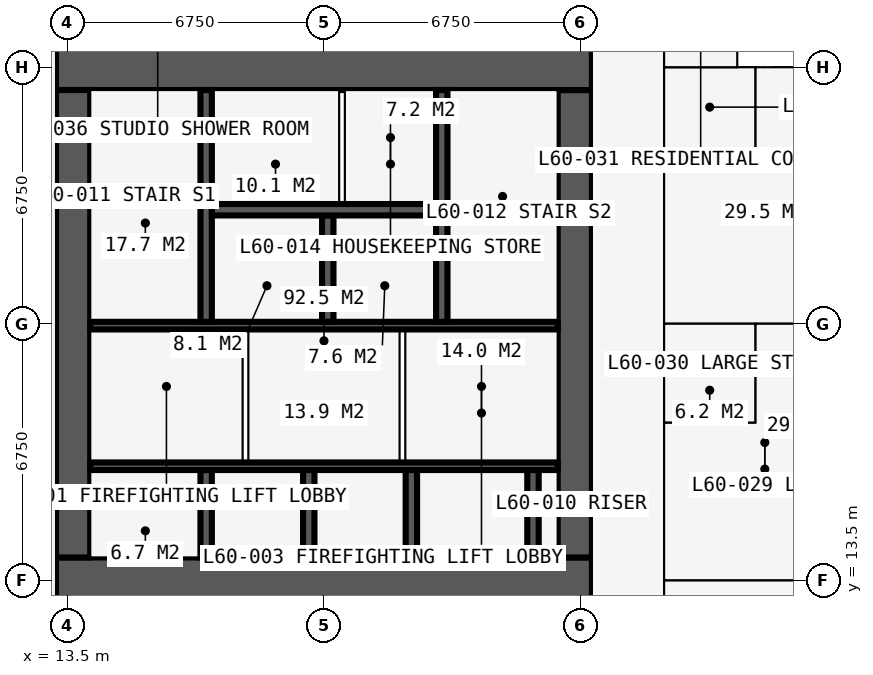
"""IFC4 building model, lengths in metres.
Left out: names, types, materials, properties, quantities, classifications, styles, units other than length and angle.
Written with IfcOpenShell. Run it as: python <this file> out.ifc"""

import sys

from ifc_helpers import new_model, si_unit, direction, frame, frame_2d, origin, place, context, subcontext, project, spatial, rectangle, extrude, element, fill, save


model = new_model("IFC4")
c1 = context("Model", 3, precision=1e-05, world=origin(), true_north=direction((0.0, 1.0)))
c2 = subcontext(c1, "Body", "Model", "MODEL_VIEW")
j1 = project(units=[si_unit("LENGTHUNIT", "METRE"), si_unit("PLANEANGLEUNIT", "RADIAN")], contexts=[c1])
p1 = place(None, origin())
s1 = spatial("IfcSite", under=j1, at=p1, CompositionType="ELEMENT")
p2 = place(p1, origin())
s2 = spatial("IfcBuilding", under=s1, at=p2, CompositionType="ELEMENT")
p3 = place(p2, frame((0.0, 0.0, 222.3)))
s3 = spatial("IfcBuildingStorey", under=s2, at=p3, CompositionType="ELEMENT", Elevation=222.3)
p4 = place(p3, frame((13.2, 13.5, 0.0), z_axis=(0.0, 0.0, 1.0), x_axis=(1.0, 0.0, 0.0)))
e1 = element("IfcWall", 1, at=p4, inside=s3, PredefinedType="SHEAR", context=c2, shape_type="SweptSolid", body=[
    extrude(rectangle(XDim=14.1, YDim=1.2, at=frame_2d((7.05, 0.0))), origin(), (0.0, 0.0, 1.0), 3.6),
])
p5 = place(p3, frame((26.85, 14.1, 0.0), z_axis=(0.0, 0.0, 1.0), x_axis=(0.0, 1.0, 0.0)))
e2 = element("IfcWall", 2, at=p5, inside=s3, PredefinedType="SHEAR", context=c2, shape_type="SweptSolid", body=[
    extrude(rectangle(XDim=12.3, YDim=0.9, at=frame_2d((6.15, 0.0))), origin(), (0.0, 0.0, 1.0), 3.6),
])
p6 = place(p5, frame((3.65, 0.0, 0.0)))
e3 = element("IfcOpeningElement", 3, at=p6, cuts=e2, PredefinedType="OPENING", context=c2, shape_type="SweptSolid", body=[
    extrude(rectangle(XDim=1.2, YDim=2.2, at=frame_2d((0.6, 1.1))), frame((0.0, 0.46, 0.0), z_axis=(0.0, -1.0, 0.0), x_axis=(1.0, 0.0, 0.0)), (0.0, 0.0, 1.0), 0.92),
])
p7 = place(p3, frame((27.3, 27.0, 0.0), z_axis=(0.0, 0.0, 1.0), x_axis=(-1.0, 0.0, 0.0)))
e4 = element("IfcWall", 4, at=p7, inside=s3, PredefinedType="SHEAR", context=c2, shape_type="SweptSolid", body=[
    extrude(rectangle(XDim=14.1, YDim=1.2, at=frame_2d((7.05, 0.0))), origin(), (0.0, 0.0, 1.0), 3.6),
])
p8 = place(p7, frame((4.55, 0.0, 0.0)))
e5 = element("IfcOpeningElement", 5, at=p8, cuts=e4, PredefinedType="OPENING", context=c2, shape_type="SweptSolid", body=[
    extrude(rectangle(XDim=0.9, YDim=2.2, at=frame_2d((0.45, 1.1))), frame((0.0, 0.61, 0.0), z_axis=(0.0, -1.0, 0.0), x_axis=(1.0, 0.0, 0.0)), (0.0, 0.0, 1.0), 1.22),
])
p9 = place(p7, frame((7.525, 0.0, 0.0)))
e6 = element("IfcOpeningElement", 6, at=p9, cuts=e4, PredefinedType="OPENING", context=c2, shape_type="SweptSolid", body=[
    extrude(rectangle(XDim=1.0, YDim=2.2, at=frame_2d((0.5, 1.1))), frame((0.0, 0.61, 0.0), z_axis=(0.0, -1.0, 0.0), x_axis=(1.0, 0.0, 0.0)), (0.0, 0.0, 1.0), 1.22),
])
p10 = place(p3, frame((13.65, 26.4, 0.0), z_axis=(0.0, 0.0, 1.0), x_axis=(0.0, -1.0, 0.0)))
e7 = element("IfcWall", 7, at=p10, inside=s3, PredefinedType="SHEAR", context=c2, shape_type="SweptSolid", body=[
    extrude(rectangle(XDim=12.3, YDim=0.9, at=frame_2d((6.15, 0.0))), origin(), (0.0, 0.0, 1.0), 3.6),
])
p11 = place(p10, frame((7.45, 0.0, 0.0)))
e8 = element("IfcOpeningElement", 8, at=p11, cuts=e7, PredefinedType="OPENING", context=c2, shape_type="SweptSolid", body=[
    extrude(rectangle(XDim=1.2, YDim=2.2, at=frame_2d((0.6, 1.1))), frame((0.0, 0.46, 0.0), z_axis=(0.0, -1.0, 0.0), x_axis=(1.0, 0.0, 0.0)), (0.0, 0.0, 1.0), 0.92),
])
p12 = place(p3, frame((14.1, 16.5, 0.0), z_axis=(0.0, 0.0, 1.0), x_axis=(1.0, 0.0, 0.0)))
e9 = element("IfcWall", 9, at=p12, inside=s3, PredefinedType="SHEAR", context=c2, shape_type="SweptSolid", body=[
    extrude(rectangle(XDim=12.3, YDim=0.2, at=frame_2d((6.15, 0.0))), origin(), (0.0, 0.0, 1.0), 3.6),
])
p13 = place(p12, frame((0.9, 0.0, 0.0)))
e10 = element("IfcOpeningElement", 10, at=p13, cuts=e9, PredefinedType="OPENING", context=c2, shape_type="SweptSolid", body=[
    extrude(rectangle(XDim=1.1, YDim=2.2, at=frame_2d((0.55, 1.1))), frame((0.0, 0.11, 0.0), z_axis=(0.0, -1.0, 0.0), x_axis=(1.0, 0.0, 0.0)), (0.0, 0.0, 1.0), 0.22),
])
p14 = place(p12, frame((4.31, 0.0, 0.0)))
e11 = element("IfcOpeningElement", 11, at=p14, cuts=e9, PredefinedType="OPENING", context=c2, shape_type="SweptSolid", body=[
    extrude(rectangle(XDim=1.1, YDim=2.2, at=frame_2d((0.55, 1.1))), frame((0.0, 0.11, 0.0), z_axis=(0.0, -1.0, 0.0), x_axis=(1.0, 0.0, 0.0)), (0.0, 0.0, 1.0), 0.22),
])
p15 = place(p12, frame((6.45, 0.0, 0.0)))
e12 = element("IfcOpeningElement", 12, at=p15, cuts=e9, PredefinedType="OPENING", context=c2, shape_type="SweptSolid", body=[
    extrude(rectangle(XDim=1.1, YDim=2.2, at=frame_2d((0.55, 1.1))), frame((0.0, 0.11, 0.0), z_axis=(0.0, -1.0, 0.0), x_axis=(1.0, 0.0, 0.0)), (0.0, 0.0, 1.0), 0.22),
])
p16 = place(p12, frame((9.5, 0.0, 0.0)))
e13 = element("IfcOpeningElement", 13, at=p16, cuts=e9, PredefinedType="OPENING", context=c2, shape_type="SweptSolid", body=[
    extrude(rectangle(XDim=1.1, YDim=2.2, at=frame_2d((0.55, 1.1))), frame((0.0, 0.11, 0.0), z_axis=(0.0, -1.0, 0.0), x_axis=(1.0, 0.0, 0.0)), (0.0, 0.0, 1.0), 0.22),
])
p17 = place(p3, frame((14.1, 20.2, 0.0), z_axis=(0.0, 0.0, 1.0), x_axis=(1.0, 0.0, 0.0)))
e14 = element("IfcWall", 14, at=p17, inside=s3, PredefinedType="SHEAR", context=c2, shape_type="SweptSolid", body=[
    extrude(rectangle(XDim=12.3, YDim=0.2, at=frame_2d((6.15, 0.0))), origin(), (0.0, 0.0, 1.0), 3.6),
])
p18 = place(p17, frame((4.56, 0.0, 0.0)))
e15 = element("IfcOpeningElement", 15, at=p18, cuts=e14, PredefinedType="OPENING", context=c2, shape_type="SweptSolid", body=[
    extrude(rectangle(XDim=1.1, YDim=2.2, at=frame_2d((0.55, 1.1))), frame((0.0, 0.11, 0.0), z_axis=(0.0, -1.0, 0.0), x_axis=(1.0, 0.0, 0.0)), (0.0, 0.0, 1.0), 0.22),
])
p19 = place(p17, frame((6.7, 0.0, 0.0)))
e16 = element("IfcOpeningElement", 16, at=p19, cuts=e14, PredefinedType="OPENING", context=c2, shape_type="SweptSolid", body=[
    extrude(rectangle(XDim=1.1, YDim=2.2, at=frame_2d((0.55, 1.1))), frame((0.0, 0.11, 0.0), z_axis=(0.0, -1.0, 0.0), x_axis=(1.0, 0.0, 0.0)), (0.0, 0.0, 1.0), 0.22),
])
p20 = place(p17, frame((0.35, 0.0, 0.0)))
e17 = element("IfcOpeningElement", 17, at=p20, cuts=e14, PredefinedType="OPENING", context=c2, shape_type="SweptSolid", body=[
    extrude(rectangle(XDim=1.1, YDim=2.2, at=frame_2d((0.55, 1.1))), frame((0.0, 0.11, 0.0), z_axis=(0.0, -1.0, 0.0), x_axis=(1.0, 0.0, 0.0)), (0.0, 0.0, 1.0), 0.22),
])
p21 = place(p17, frame((9.75, 0.0, 0.0)))
e18 = element("IfcOpeningElement", 18, at=p21, cuts=e14, PredefinedType="OPENING", context=c2, shape_type="SweptSolid", body=[
    extrude(rectangle(XDim=1.1, YDim=2.2, at=frame_2d((0.55, 1.1))), frame((0.0, 0.11, 0.0), z_axis=(0.0, -1.0, 0.0), x_axis=(1.0, 0.0, 0.0)), (0.0, 0.0, 1.0), 0.22),
])
for number, where, z_axis, x_axis in (
    (19, (17.15, 20.3, 0.0), (0.0, 0.0, 1.0), (0.0, 1.0, 0.0)),
    (20, (23.35, 20.3, 0.0), (0.0, 0.0, 1.0), (0.0, 1.0, 0.0)),
):
    element("IfcWall", number, at=place(p3, frame(where, z_axis=z_axis, x_axis=x_axis)), inside=s3, PredefinedType="SHEAR", context=c2, shape_type="SweptSolid", body=[
        extrude(rectangle(XDim=6.1, YDim=0.3, at=frame_2d((3.05, 0.0))), origin(), (0.0, 0.0, 1.0), 3.6),
    ])
p22 = place(p3, frame((20.35, 20.3, 0.0), z_axis=(0.0, 0.0, 1.0), x_axis=(0.0, 1.0, 0.0)))
e21 = element("IfcWall", 21, at=p22, inside=s3, PredefinedType="SHEAR", context=c2, shape_type="SweptSolid", body=[
    extrude(rectangle(XDim=2.8, YDim=0.3, at=frame_2d((1.4, 0.0))), origin(), (0.0, 0.0, 1.0), 3.6),
])
p23 = place(p3, frame((17.3, 23.25, 0.0), z_axis=(0.0, 0.0, 1.0), x_axis=(1.0, 0.0, 0.0)))
e22 = element("IfcWall", 22, at=p23, inside=s3, PredefinedType="SHEAR", context=c2, shape_type="SweptSolid", body=[
    extrude(rectangle(XDim=5.9, YDim=0.3, at=frame_2d((2.95, 0.0))), origin(), (0.0, 0.0, 1.0), 3.6),
])
for number, where, z_axis, x_axis in (
    (23, (17.15, 14.1, 0.0), (0.0, 0.0, 1.0), (0.0, 1.0, 0.0)),
    (24, (19.85, 14.1, 0.0), (0.0, 0.0, 1.0), (0.0, 1.0, 0.0)),
    (25, (22.55, 14.1, 0.0), (0.0, 0.0, 1.0), (0.0, 1.0, 0.0)),
    (26, (25.75, 14.1, 0.0), (0.0, 0.0, 1.0), (0.0, 1.0, 0.0)),
):
    element("IfcWall", number, at=place(p3, frame(where, z_axis=z_axis, x_axis=x_axis)), inside=s3, PredefinedType="SHEAR", context=c2, shape_type="SweptSolid", body=[
        extrude(rectangle(XDim=2.3, YDim=0.3, at=frame_2d((1.15, 0.0))), origin(), (0.0, 0.0, 1.0), 3.6),
    ])
p24 = place(p3, frame((18.185, 16.6, 0.0), z_axis=(0.0, 0.0, 1.0), x_axis=(0.0, 1.0, 0.0)))
e27 = element("IfcWall", 27, at=p24, inside=s3, PredefinedType="PARTITIONING", context=c2, shape_type="SweptSolid", body=[
    extrude(rectangle(XDim=3.5, YDim=0.15, at=frame_2d((1.75, 0.0))), origin(), (0.0, 0.0, 1.0), 3.375),
])
p25 = place(p24, frame((1.15, 0.0, 0.0)))
e28 = element("IfcOpeningElement", 28, at=p25, cuts=e27, PredefinedType="OPENING", context=c2, shape_type="SweptSolid", body=[
    extrude(rectangle(XDim=1.2, YDim=2.2, at=frame_2d((0.6, 1.1))), frame((0.0, 0.085, 0.0), z_axis=(0.0, -1.0, 0.0), x_axis=(1.0, 0.0, 0.0)), (0.0, 0.0, 1.0), 0.17),
])
p26 = place(p3, frame((22.315, 16.6, 0.0), z_axis=(0.0, 0.0, 1.0), x_axis=(0.0, 1.0, 0.0)))
e29 = element("IfcWall", 29, at=p26, inside=s3, PredefinedType="PARTITIONING", context=c2, shape_type="SweptSolid", body=[
    extrude(rectangle(XDim=3.5, YDim=0.15, at=frame_2d((1.75, 0.0))), origin(), (0.0, 0.0, 1.0), 3.375),
])
p27 = place(p26, frame((1.15, 0.0, 0.0)))
e30 = element("IfcOpeningElement", 30, at=p27, cuts=e29, PredefinedType="OPENING", context=c2, shape_type="SweptSolid", body=[
    extrude(rectangle(XDim=1.2, YDim=2.2, at=frame_2d((0.6, 1.1))), frame((0.0, 0.085, 0.0), z_axis=(0.0, -1.0, 0.0), x_axis=(1.0, 0.0, 0.0)), (0.0, 0.0, 1.0), 0.17),
])
p28 = place(p3, frame((20.725, 23.4, 0.0), z_axis=(0.0, 0.0, 1.0), x_axis=(0.0, 1.0, 0.0)))
e31 = element("IfcWall", 31, at=p28, inside=s3, PredefinedType="PARTITIONING", context=c2, shape_type="SweptSolid", body=[
    extrude(rectangle(XDim=3.0, YDim=0.15, at=frame_2d((1.5, 0.0))), origin(), (0.0, 0.0, 1.0), 3.375),
])
p29 = place(p3, frame((29.2, 11.3, 0.0), z_axis=(0.0, 0.0, 1.0), x_axis=(0.0, 1.0, 0.0)))
e32 = element("IfcWall", 32, at=p29, inside=s3, PredefinedType="PARTITIONING", context=c2, shape_type="SweptSolid", body=[
    extrude(rectangle(XDim=17.9, YDim=0.2, at=frame_2d((8.95, 0.0))), origin(), (0.0, 0.0, 1.0), 3.375),
])
p30 = place(p29, frame((0.6, 0.0, 0.0)))
e33 = element("IfcOpeningElement", 33, at=p30, cuts=e32, PredefinedType="OPENING", context=c2, shape_type="SweptSolid", body=[
    extrude(rectangle(XDim=1.0, YDim=2.2, at=frame_2d((0.5, 1.1))), frame((0.0, 0.11, 0.0), z_axis=(0.0, -1.0, 0.0), x_axis=(1.0, 0.0, 0.0)), (0.0, 0.0, 1.0), 0.22),
])
p31 = place(p29, frame((10.55, 0.0, 0.0)))
e34 = element("IfcOpeningElement", 34, at=p31, cuts=e32, PredefinedType="OPENING", context=c2, shape_type="SweptSolid", body=[
    extrude(rectangle(XDim=0.95, YDim=2.2, at=frame_2d((0.475, 1.1))), frame((0.0, 0.11, 0.0), z_axis=(0.0, -1.0, 0.0), x_axis=(1.0, 0.0, 0.0)), (0.0, 0.0, 1.0), 0.22),
])
p32 = place(p29, frame((3.8, 0.0, 0.0)))
e35 = element("IfcOpeningElement", 35, at=p32, cuts=e32, PredefinedType="OPENING", context=c2, shape_type="SweptSolid", body=[
    extrude(rectangle(XDim=0.95, YDim=2.2, at=frame_2d((0.475, 1.1))), frame((0.0, 0.11, 0.0), z_axis=(0.0, -1.0, 0.0), x_axis=(1.0, 0.0, 0.0)), (0.0, 0.0, 1.0), 0.22),
])
p33 = place(p29, frame((16.3, 0.0, 0.0)))
e36 = element("IfcOpeningElement", 36, at=p33, cuts=e32, PredefinedType="OPENING", context=c2, shape_type="SweptSolid", body=[
    extrude(rectangle(XDim=1.0, YDim=2.2, at=frame_2d((0.5, 1.1))), frame((0.0, 0.11, 0.0), z_axis=(0.0, -1.0, 0.0), x_axis=(1.0, 0.0, 0.0)), (0.0, 0.0, 1.0), 0.22),
])
p34 = place(p3, frame((29.2, 13.5, 0.0), z_axis=(0.0, 0.0, 1.0), x_axis=(1.0, 0.0, 0.0)))
e37 = element("IfcWall", 37, at=p34, inside=s3, PredefinedType="PARTITIONING", context=c2, shape_type="SweptSolid", body=[
    extrude(rectangle(XDim=5.284, YDim=0.15, at=frame_2d((2.642, 0.0))), origin(), (0.0, 0.0, 1.0), 2.877),
])
p35 = place(p3, frame((29.2, 17.65, 0.0), z_axis=(0.0, 0.0, 1.0), x_axis=(1.0, 0.0, 0.0)))
e38 = element("IfcWall", 38, at=p35, inside=s3, PredefinedType="PARTITIONING", context=c2, shape_type="SweptSolid", body=[
    extrude(rectangle(XDim=2.4, YDim=0.1, at=frame_2d((1.2, 0.0))), origin(), (0.0, 0.0, 1.0), 3.375),
])
p36 = place(p3, frame((29.2, 20.25, 0.0), z_axis=(0.0, 0.0, 1.0), x_axis=(1.0, 0.0, 0.0)))
e39 = element("IfcWall", 39, at=p36, inside=s3, PredefinedType="PARTITIONING", context=c2, shape_type="SweptSolid", body=[
    extrude(rectangle(XDim=5.284, YDim=0.175, at=frame_2d((2.642, 0.0))), origin(), (0.0, 0.0, 1.0), 2.877),
])
p37 = place(p36, frame((0.75, 0.0, 0.0)))
e40 = element("IfcOpeningElement", 40, at=p37, cuts=e39, PredefinedType="OPENING", context=c2, shape_type="SweptSolid", body=[
    extrude(rectangle(XDim=0.9, YDim=2.2, at=frame_2d((0.45, 1.1))), frame((0.0, 0.097, 0.0), z_axis=(0.0, -1.0, 0.0), x_axis=(1.0, 0.0, 0.0)), (0.0, 0.0, 1.0), 0.195),
])
p38 = place(p3, frame((29.2, 24.4, 0.0), z_axis=(0.0, 0.0, 1.0), x_axis=(1.0, 0.0, 0.0)))
e41 = element("IfcWall", 41, at=p38, inside=s3, PredefinedType="PARTITIONING", context=c2, shape_type="SweptSolid", body=[
    extrude(rectangle(XDim=2.4, YDim=0.1, at=frame_2d((1.2, 0.0))), origin(), (0.0, 0.0, 1.0), 3.375),
])
p39 = place(p3, frame((29.2, 27.0, 0.0), z_axis=(0.0, 0.0, 1.0), x_axis=(1.0, 0.0, 0.0)))
e42 = element("IfcWall", 42, at=p39, inside=s3, PredefinedType="PARTITIONING", context=c2, shape_type="SweptSolid", body=[
    extrude(rectangle(XDim=5.284, YDim=0.175, at=frame_2d((2.642, 0.0))), origin(), (0.0, 0.0, 1.0), 2.877),
])
p40 = place(p3, frame((31.125, 27.0, 0.0), z_axis=(0.0, 0.0, 1.0), x_axis=(0.0, 1.0, 0.0)))
e43 = element("IfcWall", 43, at=p40, inside=s3, PredefinedType="PARTITIONING", context=c2, shape_type="SweptSolid", body=[
    extrude(rectangle(XDim=0.734, YDim=0.15, at=frame_2d((0.367, 0.0))), origin(), (0.0, 0.0, 1.0), 3.375),
])
p41 = place(p3, frame((31.6, 17.65, 0.0), z_axis=(0.0, 0.0, 1.0), x_axis=(0.0, 1.0, 0.0)))
e44 = element("IfcWall", 44, at=p41, inside=s3, PredefinedType="PARTITIONING", context=c2, shape_type="SweptSolid", body=[
    extrude(rectangle(XDim=2.6, YDim=0.1, at=frame_2d((1.3, 0.0))), origin(), (0.0, 0.0, 1.0), 3.375),
])
p42 = place(p3, frame((31.6, 24.4, 0.0), z_axis=(0.0, 0.0, 1.0), x_axis=(0.0, 1.0, 0.0)))
e45 = element("IfcWall", 45, at=p42, inside=s3, PredefinedType="PARTITIONING", context=c2, shape_type="SweptSolid", body=[
    extrude(rectangle(XDim=2.6, YDim=0.1, at=frame_2d((1.3, 0.0))), origin(), (0.0, 0.0, 1.0), 3.375),
])
p43 = place(p42, frame((0.85, 0.0, 0.0)))
e46 = element("IfcOpeningElement", 46, at=p43, cuts=e45, PredefinedType="OPENING", context=c2, shape_type="SweptSolid", body=[
    extrude(rectangle(XDim=0.9, YDim=2.2, at=frame_2d((0.45, 1.1))), frame((0.0, 0.06, 0.0), z_axis=(0.0, -1.0, 0.0), x_axis=(1.0, 0.0, 0.0)), (0.0, 0.0, 1.0), 0.12),
])
p44 = place(p13, origin())
e47 = element("IfcDoor", 47, at=p44, inside=s3, OperationType="DOUBLE_DOOR_SLIDING", PredefinedType="DOOR", context=c2, shape_type="SweptSolid", body=[
    extrude(rectangle(XDim=1.1, YDim=2.2, at=frame_2d((0.55, 1.1))), frame((0.0, 0.025, 0.0), z_axis=(0.0, -1.0, 0.0), x_axis=(1.0, 0.0, 0.0)), (0.0, 0.0, 1.0), 0.05),
])
fill(e10, e47)
p45 = place(p14, origin())
e48 = element("IfcDoor", 48, at=p45, inside=s3, OperationType="DOUBLE_DOOR_SLIDING", PredefinedType="DOOR", context=c2, shape_type="SweptSolid", body=[
    extrude(rectangle(XDim=1.1, YDim=2.2, at=frame_2d((0.55, 1.1))), frame((0.0, 0.025, 0.0), z_axis=(0.0, -1.0, 0.0), x_axis=(1.0, 0.0, 0.0)), (0.0, 0.0, 1.0), 0.05),
])
fill(e11, e48)
p46 = place(p15, origin())
e49 = element("IfcDoor", 49, at=p46, inside=s3, OperationType="DOUBLE_DOOR_SLIDING", PredefinedType="DOOR", context=c2, shape_type="SweptSolid", body=[
    extrude(rectangle(XDim=1.1, YDim=2.2, at=frame_2d((0.55, 1.1))), frame((0.0, 0.025, 0.0), z_axis=(0.0, -1.0, 0.0), x_axis=(1.0, 0.0, 0.0)), (0.0, 0.0, 1.0), 0.05),
])
fill(e12, e49)
p47 = place(p16, origin())
e50 = element("IfcDoor", 50, at=p47, inside=s3, OperationType="DOUBLE_DOOR_SLIDING", PredefinedType="DOOR", context=c2, shape_type="SweptSolid", body=[
    extrude(rectangle(XDim=1.1, YDim=2.2, at=frame_2d((0.55, 1.1))), frame((0.0, 0.025, 0.0), z_axis=(0.0, -1.0, 0.0), x_axis=(1.0, 0.0, 0.0)), (0.0, 0.0, 1.0), 0.05),
])
fill(e13, e50)
p48 = place(p18, origin())
e51 = element("IfcDoor", 51, at=p48, inside=s3, OperationType="DOUBLE_DOOR_SLIDING", PredefinedType="DOOR", context=c2, shape_type="SweptSolid", body=[
    extrude(rectangle(XDim=1.1, YDim=2.2, at=frame_2d((0.55, 1.1))), frame((0.0, 0.025, 0.0), z_axis=(0.0, -1.0, 0.0), x_axis=(1.0, 0.0, 0.0)), (0.0, 0.0, 1.0), 0.05),
])
fill(e15, e51)
p49 = place(p19, origin())
e52 = element("IfcDoor", 52, at=p49, inside=s3, OperationType="DOUBLE_DOOR_SLIDING", PredefinedType="DOOR", context=c2, shape_type="SweptSolid", body=[
    extrude(rectangle(XDim=1.1, YDim=2.2, at=frame_2d((0.55, 1.1))), frame((0.0, 0.025, 0.0), z_axis=(0.0, -1.0, 0.0), x_axis=(1.0, 0.0, 0.0)), (0.0, 0.0, 1.0), 0.05),
])
fill(e16, e52)
p50 = place(p11, origin())
e53 = element("IfcDoor", 53, at=p50, inside=s3, OperationType="DOUBLE_DOOR_SINGLE_SWING", PredefinedType="DOOR", context=c2, shape_type="SweptSolid", body=[
    extrude(rectangle(XDim=1.2, YDim=2.2, at=frame_2d((0.6, 1.1))), frame((0.0, 0.025, 0.0), z_axis=(0.0, -1.0, 0.0), x_axis=(1.0, 0.0, 0.0)), (0.0, 0.0, 1.0), 0.05),
])
fill(e8, e53)
p51 = place(p6, origin())
e54 = element("IfcDoor", 54, at=p51, inside=s3, OperationType="DOUBLE_DOOR_SINGLE_SWING", PredefinedType="DOOR", context=c2, shape_type="SweptSolid", body=[
    extrude(rectangle(XDim=1.2, YDim=2.2, at=frame_2d((0.6, 1.1))), frame((0.0, 0.025, 0.0), z_axis=(0.0, -1.0, 0.0), x_axis=(1.0, 0.0, 0.0)), (0.0, 0.0, 1.0), 0.05),
])
fill(e3, e54)
p52 = place(p25, origin())
e55 = element("IfcDoor", 55, at=p52, inside=s3, OperationType="DOUBLE_DOOR_SINGLE_SWING", PredefinedType="DOOR", context=c2, shape_type="SweptSolid", body=[
    extrude(rectangle(XDim=1.2, YDim=2.2, at=frame_2d((0.6, 1.1))), frame((0.0, 0.025, 0.0), z_axis=(0.0, -1.0, 0.0), x_axis=(1.0, 0.0, 0.0)), (0.0, 0.0, 1.0), 0.05),
])
fill(e28, e55)
p53 = place(p27, origin())
e56 = element("IfcDoor", 56, at=p53, inside=s3, OperationType="DOUBLE_DOOR_SINGLE_SWING", PredefinedType="DOOR", context=c2, shape_type="SweptSolid", body=[
    extrude(rectangle(XDim=1.2, YDim=2.2, at=frame_2d((0.6, 1.1))), frame((0.0, 0.025, 0.0), z_axis=(0.0, -1.0, 0.0), x_axis=(1.0, 0.0, 0.0)), (0.0, 0.0, 1.0), 0.05),
])
fill(e30, e56)
p54 = place(p8, origin())
e57 = element("IfcDoor", 57, at=p54, inside=s3, OperationType="SINGLE_SWING_LEFT", PredefinedType="DOOR", context=c2, shape_type="SweptSolid", body=[
    extrude(rectangle(XDim=0.9, YDim=2.2, at=frame_2d((0.45, 1.1))), frame((0.0, 0.4, 0.0), z_axis=(0.0, -1.0, 0.0), x_axis=(1.0, 0.0, 0.0)), (0.0, 0.0, 1.0), 0.8),
])
fill(e5, e57)
p55 = place(p9, origin())
e58 = element("IfcDoor", 58, at=p55, inside=s3, OperationType="SINGLE_SWING_LEFT", PredefinedType="DOOR", context=c2, shape_type="SweptSolid", body=[
    extrude(rectangle(XDim=1.0, YDim=2.2, at=frame_2d((0.5, 1.1))), frame((0.0, 0.025, 0.0), z_axis=(0.0, -1.0, 0.0), x_axis=(1.0, 0.0, 0.0)), (0.0, 0.0, 1.0), 0.05),
])
fill(e6, e58)
p56 = place(p20, origin())
e59 = element("IfcDoor", 59, at=p56, inside=s3, OperationType="SINGLE_SWING_LEFT", PredefinedType="DOOR", context=c2, shape_type="SweptSolid", body=[
    extrude(rectangle(XDim=1.1, YDim=2.2, at=frame_2d((0.55, 1.1))), frame((0.0, 0.025, 0.0), z_axis=(0.0, -1.0, 0.0), x_axis=(1.0, 0.0, 0.0)), (0.0, 0.0, 1.0), 0.05),
])
fill(e17, e59)
p57 = place(p21, origin())
e60 = element("IfcDoor", 60, at=p57, inside=s3, OperationType="SINGLE_SWING_LEFT", PredefinedType="DOOR", context=c2, shape_type="SweptSolid", body=[
    extrude(rectangle(XDim=1.1, YDim=2.2, at=frame_2d((0.55, 1.1))), frame((0.0, 0.025, 0.0), z_axis=(0.0, -1.0, 0.0), x_axis=(1.0, 0.0, 0.0)), (0.0, 0.0, 1.0), 0.05),
])
fill(e18, e60)
p58 = place(p31, origin())
e61 = element("IfcDoor", 61, at=p58, inside=s3, OperationType="SINGLE_SWING_LEFT", PredefinedType="DOOR", context=c2, shape_type="SweptSolid", body=[
    extrude(rectangle(XDim=0.95, YDim=2.2, at=frame_2d((0.475, 1.1))), frame((0.0, 0.025, 0.0), z_axis=(0.0, -1.0, 0.0), x_axis=(1.0, 0.0, 0.0)), (0.0, 0.0, 1.0), 0.05),
])
fill(e34, e61)
p59 = place(p43, origin())
e62 = element("IfcDoor", 62, at=p59, inside=s3, OperationType="SINGLE_SWING_RIGHT", PredefinedType="DOOR", context=c2, shape_type="SweptSolid", body=[
    extrude(rectangle(XDim=0.9, YDim=2.2, at=frame_2d((0.45, 1.1))), frame((0.0, 0.025, 0.0), z_axis=(0.0, -1.0, 0.0), x_axis=(1.0, 0.0, 0.0)), (0.0, 0.0, 1.0), 0.05),
])
fill(e46, e62)
p60 = place(p32, origin())
e63 = element("IfcDoor", 63, at=p60, inside=s3, OperationType="SINGLE_SWING_LEFT", PredefinedType="DOOR", context=c2, shape_type="SweptSolid", body=[
    extrude(rectangle(XDim=0.95, YDim=2.2, at=frame_2d((0.475, 1.1))), frame((0.0, 0.025, 0.0), z_axis=(0.0, -1.0, 0.0), x_axis=(1.0, 0.0, 0.0)), (0.0, 0.0, 1.0), 0.05),
])
fill(e35, e63)
p61 = place(p37, origin())
e64 = element("IfcDoor", 64, at=p61, inside=s3, OperationType="SINGLE_SWING_RIGHT", PredefinedType="DOOR", context=c2, shape_type="SweptSolid", body=[
    extrude(rectangle(XDim=0.9, YDim=2.2, at=frame_2d((0.45, 1.1))), frame((0.0, 0.025, 0.0), z_axis=(0.0, -1.0, 0.0), x_axis=(1.0, 0.0, 0.0)), (0.0, 0.0, 1.0), 0.05),
])
fill(e40, e64)
save(model, sys.argv[1])
